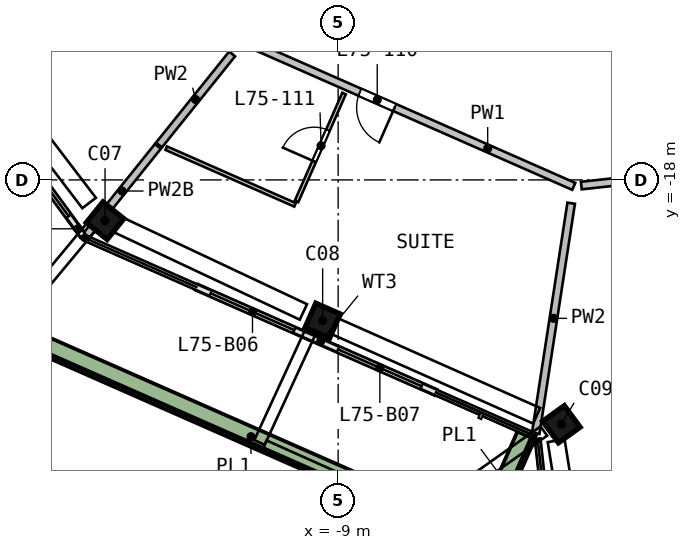
"""IFC4 building model, lengths in metres.
Left out: names, types, materials, properties, quantities, classifications, styles, units other than length and angle.
Written with IfcOpenShell. Run it as: python <this file> out.ifc"""

import sys

from ifc_helpers import new_model, si_unit, direction, frame, frame_2d, origin, origin_2d, place, context, subcontext, project, spatial, rectangle, extrude, element, fill, save


model = new_model("IFC4")
c1 = context("Model", 3, precision=1e-05, world=origin(), true_north=direction((0.0, 1.0)))
c2 = subcontext(c1, "Body", "Model", "MODEL_VIEW")
j1 = project(units=[si_unit("LENGTHUNIT", "METRE"), si_unit("PLANEANGLEUNIT", "RADIAN")], contexts=[c1])
p1 = place(None, origin())
s1 = spatial("IfcSite", under=j1, at=p1, CompositionType="ELEMENT")
p2 = place(p1, origin())
s2 = spatial("IfcBuilding", under=s1, at=p2, CompositionType="ELEMENT")
p3 = place(p2, frame((0.0, 0.0, 303.0)))
s3 = spatial("IfcBuildingStorey", under=s2, at=p3, CompositionType="ELEMENT", Elevation=303.0)
p4 = place(p3, frame((-15.243, -18.986, 0.0), z_axis=(0.090919185, -0.0717623, 0.993269286), x_axis=(-0.774414013, 0.621986949, 0.115823882)))
e1 = element("IfcColumn", 1, at=p4, inside=s3, PredefinedType="COLUMN", context=c2, shape_type="SweptSolid", body=[
    extrude(rectangle(XDim=0.7, YDim=0.7, at=origin_2d()), origin(), (0.0, 0.0, 1.0), 3.212),
])
p5 = place(p3, frame((-9.532, -21.653, 0.0), z_axis=(0.103349904, -0.044488369, 0.993649628), x_axis=(0.909315502, -0.400606791, -0.112514522)))
e2 = element("IfcColumn", 2, at=p5, inside=s3, PredefinedType="COLUMN", context=c2, shape_type="SweptSolid", body=[
    extrude(rectangle(XDim=0.7, YDim=0.7, at=origin_2d()), origin(), (0.0, 0.0, 1.0), 3.21),
])
p6 = place(p3, frame((-3.266, -24.412, 0.0), z_axis=(0.116215921, -0.014517489, 0.993117869), x_axis=(-0.583994019, 0.807791599, 0.080148098)))
e3 = element("IfcColumn", 3, at=p6, inside=s3, PredefinedType="COLUMN", context=c2, shape_type="SweptSolid", body=[
    extrude(rectangle(XDim=0.7, YDim=0.7, at=origin_2d()), origin(), (0.0, 0.0, 1.0), 3.212),
])
p7 = place(p3, frame((-17.747, -16.694, 0.0), z_axis=(0.0, 0.0, 1.0), x_axis=(0.591128897, -0.806577105, 0.0)))
e4 = element("IfcWall", 4, at=p7, inside=s3, PredefinedType="SOLIDWALL", context=c2, shape_type="SweptSolid", body=[
    extrude(rectangle(XDim=3.427, YDim=0.15, at=frame_2d((1.713, 0.0))), origin(), (0.0, 0.0, 1.0), 2.525),
])
p8 = place(p7, frame((0.4, 0.0, 0.0)))
e5 = element("IfcOpeningElement", 5, at=p8, cuts=e4, PredefinedType="OPENING", context=c2, shape_type="SweptSolid", body=[
    extrude(rectangle(XDim=2.4, YDim=2.4, at=frame_2d((1.2, 1.2))), frame((0.0, 0.085, 0.0), z_axis=(0.0, -1.0, 0.0), x_axis=(1.0, 0.0, 0.0)), (0.0, 0.0, 1.0), 0.17),
])
p9 = place(p3, frame((-12.718, -20.824, 0.0), z_axis=(0.0, 0.0, 1.0), x_axis=(0.915258533, -0.402866999, 0.0)))
e6 = element("IfcWall", 6, at=p9, inside=s3, PredefinedType="SOLIDWALL", context=c2, shape_type="SweptSolid", body=[
    extrude(rectangle(XDim=3.25, YDim=0.15, at=frame_2d((1.625, 0.0))), origin(), (0.0, 0.0, 1.0), 2.525),
])
p10 = place(p9, frame((0.4, 0.0, 0.0)))
e7 = element("IfcOpeningElement", 7, at=p10, cuts=e6, PredefinedType="OPENING", context=c2, shape_type="SweptSolid", body=[
    extrude(rectangle(XDim=2.4, YDim=2.4, at=frame_2d((1.2, 1.2))), frame((0.0, 0.085, 0.0), z_axis=(0.0, -1.0, 0.0), x_axis=(1.0, 0.0, 0.0)), (0.0, 0.0, 1.0), 0.17),
])
p11 = place(p3, frame((-9.744, -22.134, 0.0), z_axis=(0.0, 0.0, 1.0), x_axis=(0.915233272, -0.402924383, 0.0)))
e8 = element("IfcWall", 8, at=p11, inside=s3, PredefinedType="SOLIDWALL", context=c2, shape_type="SweptSolid", body=[
    extrude(rectangle(XDim=3.611, YDim=0.15, at=frame_2d((1.806, 0.0))), origin(), (0.0, 0.0, 1.0), 2.525),
])
p12 = place(p11, frame((0.811, 0.0, 0.0)))
e9 = element("IfcOpeningElement", 9, at=p12, cuts=e8, PredefinedType="OPENING", context=c2, shape_type="SweptSolid", body=[
    extrude(rectangle(XDim=2.4, YDim=2.4, at=frame_2d((1.2, 1.2))), frame((0.0, 0.085, 0.0), z_axis=(0.0, -1.0, 0.0), x_axis=(1.0, 0.0, 0.0)), (0.0, 0.0, 1.0), 0.17),
])
p13 = place(p3, frame((-17.574, -21.992, 0.0), z_axis=(0.0, 0.0, 1.0), x_axis=(0.915240781, -0.402907326, 0.0)))
e10 = element("IfcWall", 10, at=p13, inside=s3, PredefinedType="SOLIDWALL", context=c2, shape_type="SweptSolid", body=[
    extrude(rectangle(XDim=13.723, YDim=0.5, at=frame_2d((6.862, 0.0))), origin(), (0.0, 0.0, 1.0), 0.7),
])
p14 = place(p3, frame((-5.141, -27.192, 0.0), z_axis=(0.0, 0.0, 1.0), x_axis=(0.402862888, 0.915260342, 0.0)))
e11 = element("IfcWall", 11, at=p14, inside=s3, PredefinedType="SOLIDWALL", context=c2, shape_type="SweptSolid", body=[
    extrude(rectangle(XDim=2.699, YDim=0.5, at=frame_2d((1.35, 0.0))), origin(), (0.0, 0.0, 1.0), 0.7),
])
p15 = place(p3, frame((-2.8, -18.17, 0.0), z_axis=(0.0, 0.0, 1.0), x_axis=(-0.915232324, 0.402926536, 0.0)))
e12 = element("IfcWall", 12, at=p15, inside=s3, PredefinedType="SOLIDWALL", context=c2, shape_type="SweptSolid", body=[
    extrude(rectangle(XDim=9.317, YDim=0.2, at=frame_2d((4.658, 0.0))), origin(), (0.0, 0.0, 1.0), 3.19),
])
p16 = place(p15, frame((5.15, 0.0, 0.0)))
e13 = element("IfcOpeningElement", 13, at=p16, cuts=e12, PredefinedType="OPENING", context=c2, shape_type="SweptSolid", body=[
    extrude(rectangle(XDim=1.0, YDim=2.1, at=frame_2d((0.5, 1.05))), frame((0.0, 0.11, 0.0), z_axis=(0.0, -1.0, 0.0), x_axis=(1.0, 0.0, 0.0)), (0.0, 0.0, 1.0), 0.22),
])
p17 = place(p3, frame((6.66, -17.136, 0.0), z_axis=(0.0, 0.0, 1.0), x_axis=(-0.994074922, -0.108697055, 0.0)))
e14 = element("IfcWall", 14, at=p17, inside=s3, PredefinedType="SOLIDWALL", context=c2, shape_type="SweptSolid", body=[
    extrude(rectangle(XDim=9.317, YDim=0.2, at=frame_2d((4.658, 0.0))), origin(), (0.0, 0.0, 1.0), 3.19),
])
p18 = place(p17, frame((3.835, 0.0, 0.0)))
e15 = element("IfcOpeningElement", 15, at=p18, cuts=e14, PredefinedType="OPENING", context=c2, shape_type="SweptSolid", body=[
    extrude(rectangle(XDim=1.8, YDim=2.1, at=frame_2d((0.9, 1.05))), frame((0.0, 0.11, 0.0), z_axis=(0.0, -1.0, 0.0), x_axis=(1.0, 0.0, 0.0)), (0.0, 0.0, 1.0), 0.22),
])
p19 = place(p3, frame((-13.744, -17.118, 0.0), z_axis=(0.0, 0.0, 1.0), x_axis=(-0.626058521, -0.779776076, 0.0)))
e16 = element("IfcWall", 16, at=p19, inside=s3, PredefinedType="SOLIDWALL", context=c2, shape_type="SweptSolid", body=[
    extrude(rectangle(XDim=3.011, YDim=0.2, at=frame_2d((1.506, 0.0))), origin(), (0.0, 0.0, 1.0), 2.69),
])
p20 = place(p3, frame((-11.79, -14.685, 0.0), z_axis=(0.0, 0.0, 1.0), x_axis=(-0.626049846, -0.77978304, 0.0)))
e17 = element("IfcWall", 17, at=p20, inside=s3, PredefinedType="SOLIDWALL", context=c2, shape_type="SweptSolid", body=[
    extrude(rectangle(XDim=3.074, YDim=0.2, at=frame_2d((1.537, 0.0))), origin(), (0.0, 0.0, 1.0), 3.19),
])
p21 = place(p3, frame((-3.802, -24.673, 0.0), z_axis=(0.0, 0.0, 1.0), x_axis=(0.152326438, 0.988330237, 0.0)))
e18 = element("IfcWall", 18, at=p21, inside=s3, PredefinedType="SOLIDWALL", context=c2, shape_type="SweptSolid", body=[
    extrude(rectangle(XDim=6.132, YDim=0.2, at=frame_2d((3.066, 0.0))), origin(), (0.0, 0.0, 1.0), 3.19),
])
p22 = place(p3, frame((-10.134, -18.656, 0.0), z_axis=(0.0, 0.0, 1.0), x_axis=(-0.915262542, 0.40285789, 0.0)))
e19 = element("IfcWall", 19, at=p22, inside=s3, PredefinedType="PARTITIONING", context=c2, shape_type="SweptSolid", body=[
    extrude(rectangle(XDim=3.704, YDim=0.1, at=frame_2d((1.852, 0.0))), origin(), (0.0, 0.0, 1.0), 3.19),
])
p23 = place(p3, frame((-10.094, -18.565, 0.0), z_axis=(0.0, 0.0, 1.0), x_axis=(0.402920719, 0.915234885, 0.0)))
e20 = element("IfcWall", 20, at=p23, inside=s3, PredefinedType="PARTITIONING", context=c2, shape_type="SweptSolid", body=[
    extrude(rectangle(XDim=3.1, YDim=0.1, at=frame_2d((1.55, 0.0))), origin(), (0.0, 0.0, 1.0), 3.19),
])
p24 = place(p23, frame((1.15, 0.0, 0.0)))
e21 = element("IfcOpeningElement", 21, at=p24, cuts=e20, PredefinedType="OPENING", context=c2, shape_type="SweptSolid", body=[
    extrude(rectangle(XDim=0.9, YDim=2.1, at=frame_2d((0.45, 1.05))), frame((0.0, 0.06, 0.0), z_axis=(0.0, -1.0, 0.0), x_axis=(1.0, 0.0, 0.0)), (0.0, 0.0, 1.0), 0.12),
])
p25 = place(p8, origin())
e22 = element("IfcDoor", 22, at=p25, inside=s3, OperationType="SLIDING_TO_RIGHT", PredefinedType="DOOR", context=c2, shape_type="SweptSolid", body=[
    extrude(rectangle(XDim=2.4, YDim=2.4, at=frame_2d((1.2, 1.2))), frame((0.0, 0.025, 0.0), z_axis=(0.0, -1.0, 0.0), x_axis=(1.0, 0.0, 0.0)), (0.0, 0.0, 1.0), 0.05),
])
fill(e5, e22)
p26 = place(p10, origin())
e23 = element("IfcDoor", 23, at=p26, inside=s3, OperationType="SLIDING_TO_RIGHT", PredefinedType="DOOR", context=c2, shape_type="SweptSolid", body=[
    extrude(rectangle(XDim=2.4, YDim=2.4, at=frame_2d((1.2, 1.2))), frame((0.0, 0.025, 0.0), z_axis=(0.0, -1.0, 0.0), x_axis=(1.0, 0.0, 0.0)), (0.0, 0.0, 1.0), 0.05),
])
fill(e7, e23)
p27 = place(p12, origin())
e24 = element("IfcDoor", 24, at=p27, inside=s3, OperationType="SLIDING_TO_LEFT", PredefinedType="DOOR", context=c2, shape_type="SweptSolid", body=[
    extrude(rectangle(XDim=2.4, YDim=2.4, at=frame_2d((1.2, 1.2))), frame((0.0, 0.025, 0.0), z_axis=(0.0, -1.0, 0.0), x_axis=(1.0, 0.0, 0.0)), (0.0, 0.0, 1.0), 0.05),
])
fill(e9, e24)
p28 = place(p16, origin())
e25 = element("IfcDoor", 25, at=p28, inside=s3, OperationType="SINGLE_SWING_LEFT", PredefinedType="DOOR", context=c2, shape_type="SweptSolid", body=[
    extrude(rectangle(XDim=1.0, YDim=2.1, at=frame_2d((0.5, 1.05))), frame((0.0, 0.025, 0.0), z_axis=(0.0, -1.0, 0.0), x_axis=(1.0, 0.0, 0.0)), (0.0, 0.0, 1.0), 0.05),
])
fill(e13, e25)
p29 = place(p24, origin())
e26 = element("IfcDoor", 26, at=p29, inside=s3, OperationType="SINGLE_SWING_LEFT", PredefinedType="DOOR", context=c2, shape_type="SweptSolid", body=[
    extrude(rectangle(XDim=0.9, YDim=2.1, at=frame_2d((0.45, 1.05))), frame((0.0, 0.025, 0.0), z_axis=(0.0, -1.0, 0.0), x_axis=(1.0, 0.0, 0.0)), (0.0, 0.0, 1.0), 0.05),
])
fill(e21, e26)
save(model, sys.argv[1])
